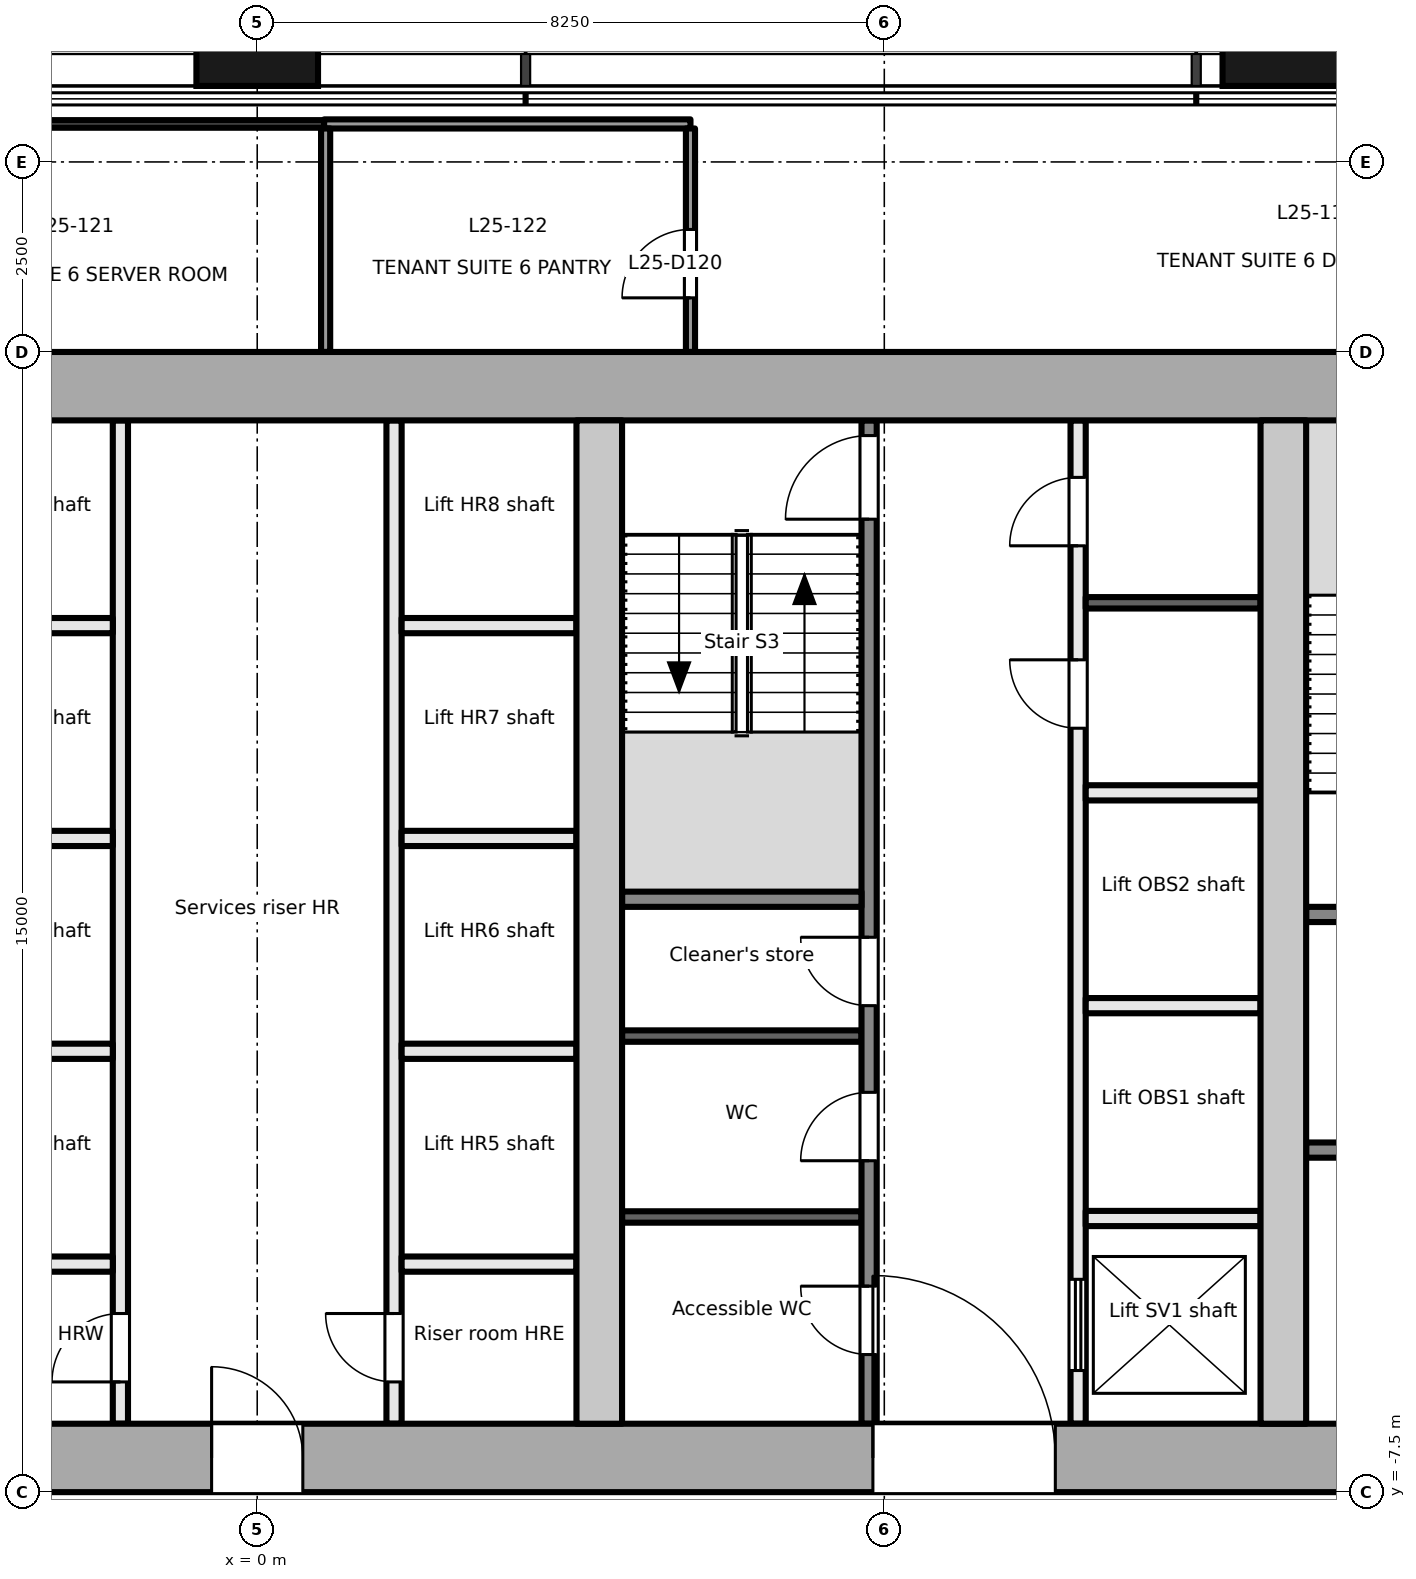
"""IFC4 building model, lengths in metres.
Left out: names, types, materials, properties, quantities, classifications, styles, units other than length and angle.
Written with IfcOpenShell. Run it as: python <this file> out.ifc"""

import sys

from ifc_helpers import new_model, si_unit, direction, frame, frame_2d, origin, origin_2d, place, context, subcontext, project, spatial, rectangle, extrude, element, fill, save


model = new_model("IFC4")
c1 = context("Model", 3, precision=1e-05, world=origin(), true_north=direction((0.0, 1.0)))
c2 = subcontext(c1, "Body", "Model", "MODEL_VIEW")
j1 = project(units=[si_unit("LENGTHUNIT", "METRE"), si_unit("PLANEANGLEUNIT", "RADIAN")], contexts=[c1])
p1 = place(None, origin())
s1 = spatial("IfcSite", under=j1, at=p1, CompositionType="ELEMENT")
p2 = place(p1, origin())
s2 = spatial("IfcBuilding", under=s1, at=p2, CompositionType="ELEMENT")
p3 = place(p2, frame((0.0, 0.0, 111.7)))
s3 = spatial("IfcBuildingStorey", under=s2, at=p3, CompositionType="ELEMENT", Elevation=111.7)
for number, where, z_axis, x_axis in (
    (1, (0.0, 11.9, -0.2), (0.0, 0.0, 1.0), (1.0, 0.0, 0.0)),
    (2, (13.5, 11.9, -0.2), (0.0, 0.0, 1.0), (1.0, 0.0, 0.0)),
):
    element("IfcColumn", number, at=place(p3, frame(where, z_axis=z_axis, x_axis=x_axis)), inside=s3, PredefinedType="COLUMN", context=c2, shape_type="SweptSolid", body=[
        extrude(rectangle(XDim=1.6, YDim=1.8, at=origin_2d()), origin(), (0.0, 0.0, 1.0), 4.0),
    ])
p4 = place(p3, frame((-18.0, -7.05, -0.2), z_axis=(0.0, 0.0, 1.0), x_axis=(1.0, 0.0, 0.0)))
e3 = element("IfcWall", 3, at=p4, inside=s3, PredefinedType="SHEAR", context=c2, shape_type="SweptSolid", body=[
    extrude(rectangle(XDim=36.0, YDim=0.9, at=frame_2d((18.0, 0.0))), origin(), (0.0, 0.0, 1.0), 4.0),
])
p5 = place(p4, frame((7.8, 0.0, 0.2)))
e4 = element("IfcOpeningElement", 4, at=p5, cuts=e3, PredefinedType="OPENING", context=c2, shape_type="SweptSolid", body=[
    extrude(rectangle(XDim=2.4, YDim=2.1, at=frame_2d((1.2, 1.05))), frame((0.0, 0.46, 0.0), z_axis=(0.0, -1.0, 0.0), x_axis=(1.0, 0.0, 0.0)), (0.0, 0.0, 1.0), 0.921),
])
p6 = place(p4, frame((17.4, 0.0, 0.2)))
e5 = element("IfcOpeningElement", 5, at=p6, cuts=e3, PredefinedType="OPENING", context=c2, shape_type="SweptSolid", body=[
    extrude(rectangle(XDim=1.2, YDim=2.1, at=frame_2d((0.6, 1.05))), frame((0.0, 0.46, 0.0), z_axis=(0.0, -1.0, 0.0), x_axis=(1.0, 0.0, 0.0)), (0.0, 0.0, 1.0), 0.921),
])
p7 = place(p4, frame((26.1, 0.0, 0.2)))
e6 = element("IfcOpeningElement", 6, at=p7, cuts=e3, PredefinedType="OPENING", context=c2, shape_type="SweptSolid", body=[
    extrude(rectangle(XDim=2.4, YDim=2.1, at=frame_2d((1.2, 1.05))), frame((0.0, 0.46, 0.0), z_axis=(0.0, -1.0, 0.0), x_axis=(1.0, 0.0, 0.0)), (0.0, 0.0, 1.0), 0.921),
])
p8 = place(p3, frame((-18.0, 7.05, -0.2), z_axis=(0.0, 0.0, 1.0), x_axis=(1.0, 0.0, 0.0)))
e7 = element("IfcWall", 7, at=p8, inside=s3, PredefinedType="SHEAR", context=c2, shape_type="SweptSolid", body=[
    extrude(rectangle(XDim=36.0, YDim=0.9, at=frame_2d((18.0, 0.0))), origin(), (0.0, 0.0, 1.0), 4.0),
])
for number, where, z_axis, x_axis in (
    (8, (4.5, -6.6, -0.2), (0.0, 0.0, 1.0), (0.0, 1.0, 0.0)),
    (9, (13.5, -6.6, -0.2), (0.0, 0.0, 1.0), (0.0, 1.0, 0.0)),
):
    element("IfcWall", number, at=place(p3, frame(where, z_axis=z_axis, x_axis=x_axis)), inside=s3, PredefinedType="SHEAR", context=c2, shape_type="SweptSolid", body=[
        extrude(rectangle(XDim=13.2, YDim=0.6, at=frame_2d((6.6, 0.0))), origin(), (0.0, 0.0, 1.0), 4.0),
    ])
p9 = place(p3, frame((13.8, -3.0, 0.0), z_axis=(0.0, 0.0, 1.0), x_axis=(1.0, 0.0, 0.0)))
e10 = element("IfcWall", 10, at=p9, inside=s3, PredefinedType="PARTITIONING", context=c2, shape_type="SweptSolid", body=[
    extrude(rectangle(XDim=3.3, YDim=0.2, at=frame_2d((1.65, 0.0))), origin(), (0.0, 0.0, 1.0), 3.8),
])
p10 = place(p9, frame((1.1, 0.0, 0.0)))
e11 = element("IfcOpeningElement", 11, at=p10, cuts=e10, PredefinedType="OPENING", context=c2, shape_type="SweptSolid", body=[
    extrude(rectangle(XDim=1.1, YDim=2.1, at=frame_2d((0.55, 1.05))), frame((0.0, 0.111, 0.0), z_axis=(0.0, -1.0, 0.0), x_axis=(1.0, 0.0, 0.0)), (0.0, 0.0, 1.0), 0.221),
])
p11 = place(p3, frame((13.8, 0.1, 0.0), z_axis=(0.0, 0.0, 1.0), x_axis=(1.0, 0.0, 0.0)))
e12 = element("IfcWall", 12, at=p11, inside=s3, PredefinedType="PARTITIONING", context=c2, shape_type="SweptSolid", body=[
    extrude(rectangle(XDim=3.3, YDim=0.2, at=frame_2d((1.65, 0.0))), origin(), (0.0, 0.0, 1.0), 3.8),
])
p12 = place(p11, frame((1.1, 0.0, 0.0)))
e13 = element("IfcOpeningElement", 13, at=p12, cuts=e12, PredefinedType="OPENING", context=c2, shape_type="SweptSolid", body=[
    extrude(rectangle(XDim=1.1, YDim=2.1, at=frame_2d((0.55, 1.05))), frame((0.0, 0.111, 0.0), z_axis=(0.0, -1.0, 0.0), x_axis=(1.0, 0.0, 0.0)), (0.0, 0.0, 1.0), 0.221),
])
p13 = place(p3, frame((-1.8, -6.6, 0.0), z_axis=(0.0, 0.0, 1.0), x_axis=(0.0, 1.0, 0.0)))
e14 = element("IfcWall", 14, at=p13, inside=s3, PredefinedType="PARTITIONING", context=c2, shape_type="SweptSolid", body=[
    extrude(rectangle(XDim=13.2, YDim=0.2, at=frame_2d((6.6, 0.0))), origin(), (0.0, 0.0, 1.0), 3.8),
])
p14 = place(p13, frame((0.55, 0.0, 0.0)))
e15 = element("IfcOpeningElement", 15, at=p14, cuts=e14, PredefinedType="OPENING", context=c2, shape_type="SweptSolid", body=[
    extrude(rectangle(XDim=0.9, YDim=2.1, at=frame_2d((0.45, 1.05))), frame((0.0, 0.111, 0.0), z_axis=(0.0, -1.0, 0.0), x_axis=(1.0, 0.0, 0.0)), (0.0, 0.0, 1.0), 0.221),
])
p15 = place(p3, frame((1.8, -6.6, 0.0), z_axis=(0.0, 0.0, 1.0), x_axis=(0.0, 1.0, 0.0)))
e16 = element("IfcWall", 16, at=p15, inside=s3, PredefinedType="PARTITIONING", context=c2, shape_type="SweptSolid", body=[
    extrude(rectangle(XDim=13.2, YDim=0.2, at=frame_2d((6.6, 0.0))), origin(), (0.0, 0.0, 1.0), 3.8),
])
p16 = place(p15, frame((0.55, 0.0, 0.0)))
e17 = element("IfcOpeningElement", 17, at=p16, cuts=e16, PredefinedType="OPENING", context=c2, shape_type="SweptSolid", body=[
    extrude(rectangle(XDim=0.9, YDim=2.1, at=frame_2d((0.45, 1.05))), frame((0.0, 0.111, 0.0), z_axis=(0.0, -1.0, 0.0), x_axis=(1.0, 0.0, 0.0)), (0.0, 0.0, 1.0), 0.221),
])
for number, where, z_axis, x_axis in (
    (18, (-4.2, -1.7, 0.0), (0.0, 0.0, 1.0), (1.0, 0.0, 0.0)),
    (19, (-4.2, 1.1, 0.0), (0.0, 0.0, 1.0), (1.0, 0.0, 0.0)),
    (20, (-4.2, 3.9, 0.0), (0.0, 0.0, 1.0), (1.0, 0.0, 0.0)),
    (21, (-4.2, -4.5, 0.0), (0.0, 0.0, 1.0), (1.0, 0.0, 0.0)),
    (22, (1.9, -1.7, 0.0), (0.0, 0.0, 1.0), (1.0, 0.0, 0.0)),
    (23, (1.9, 1.1, 0.0), (0.0, 0.0, 1.0), (1.0, 0.0, 0.0)),
    (24, (1.9, 3.9, 0.0), (0.0, 0.0, 1.0), (1.0, 0.0, 0.0)),
    (25, (1.9, -4.5, 0.0), (0.0, 0.0, 1.0), (1.0, 0.0, 0.0)),
):
    element("IfcWall", number, at=place(p3, frame(where, z_axis=z_axis, x_axis=x_axis)), inside=s3, PredefinedType="PARTITIONING", context=c2, shape_type="SweptSolid", body=[
        extrude(rectangle(XDim=2.3, YDim=0.2, at=frame_2d((1.15, 0.0))), origin(), (0.0, 0.0, 1.0), 3.8),
    ])
p17 = place(p3, frame((8.05, -6.6, 0.0), z_axis=(0.0, 0.0, 1.0), x_axis=(0.0, 1.0, 0.0)))
e26 = element("IfcWall", 26, at=p17, inside=s3, PredefinedType="PARTITIONING", context=c2, shape_type="SweptSolid", body=[
    extrude(rectangle(XDim=13.2, YDim=0.2, at=frame_2d((6.6, 0.0))), origin(), (0.0, 0.0, 1.0), 3.8),
])
p18 = place(p17, frame((0.91, 0.0, 0.0)))
e27 = element("IfcOpeningElement", 27, at=p18, cuts=e26, PredefinedType="OPENING", context=c2, shape_type="SweptSolid", body=[
    extrude(rectangle(XDim=0.9, YDim=2.1, at=frame_2d((0.45, 1.05))), frame((0.0, 0.111, 0.0), z_axis=(0.0, -1.0, 0.0), x_axis=(1.0, 0.0, 0.0)), (0.0, 0.0, 1.0), 0.221),
])
p19 = place(p17, frame((3.46, 0.0, 0.0)))
e28 = element("IfcOpeningElement", 28, at=p19, cuts=e26, PredefinedType="OPENING", context=c2, shape_type="SweptSolid", body=[
    extrude(rectangle(XDim=0.9, YDim=2.1, at=frame_2d((0.45, 1.05))), frame((0.0, 0.111, 0.0), z_axis=(0.0, -1.0, 0.0), x_axis=(1.0, 0.0, 0.0)), (0.0, 0.0, 1.0), 0.221),
])
p20 = place(p17, frame((5.5, 0.0, 0.0)))
e29 = element("IfcOpeningElement", 29, at=p20, cuts=e26, PredefinedType="OPENING", context=c2, shape_type="SweptSolid", body=[
    extrude(rectangle(XDim=0.9, YDim=2.1, at=frame_2d((0.45, 1.05))), frame((0.0, 0.111, 0.0), z_axis=(0.0, -1.0, 0.0), x_axis=(1.0, 0.0, 0.0)), (0.0, 0.0, 1.0), 0.221),
])
p21 = place(p17, frame((11.9, 0.0, 0.0)))
e30 = element("IfcOpeningElement", 30, at=p21, cuts=e26, PredefinedType="OPENING", context=c2, shape_type="SweptSolid", body=[
    extrude(rectangle(XDim=1.1, YDim=2.1, at=frame_2d((0.55, 1.05))), frame((0.0, 0.111, 0.0), z_axis=(0.0, -1.0, 0.0), x_axis=(1.0, 0.0, 0.0)), (0.0, 0.0, 1.0), 0.221),
])
p22 = place(p3, frame((10.8, -6.6, 0.0), z_axis=(0.0, 0.0, 1.0), x_axis=(0.0, 1.0, 0.0)))
e31 = element("IfcWall", 31, at=p22, inside=s3, PredefinedType="PARTITIONING", context=c2, shape_type="SweptSolid", body=[
    extrude(rectangle(XDim=13.2, YDim=0.2, at=frame_2d((6.6, 0.0))), origin(), (0.0, 0.0, 1.0), 3.8),
])
p23 = place(p22, frame((0.7, 0.0, 0.0)))
e32 = element("IfcOpeningElement", 32, at=p23, cuts=e31, PredefinedType="OPENING", context=c2, shape_type="SweptSolid", body=[
    extrude(rectangle(XDim=1.2, YDim=2.1, at=frame_2d((0.6, 1.05))), frame((0.0, 0.111, 0.0), z_axis=(0.0, -1.0, 0.0), x_axis=(1.0, 0.0, 0.0)), (0.0, 0.0, 1.0), 0.221),
])
p24 = place(p22, frame((9.15, 0.0, 0.0)))
e33 = element("IfcOpeningElement", 33, at=p24, cuts=e31, PredefinedType="OPENING", context=c2, shape_type="SweptSolid", body=[
    extrude(rectangle(XDim=0.9, YDim=2.1, at=frame_2d((0.45, 1.05))), frame((0.0, 0.111, 0.0), z_axis=(0.0, -1.0, 0.0), x_axis=(1.0, 0.0, 0.0)), (0.0, 0.0, 1.0), 0.221),
])
p25 = place(p22, frame((11.55, 0.0, 0.0)))
e34 = element("IfcOpeningElement", 34, at=p25, cuts=e31, PredefinedType="OPENING", context=c2, shape_type="SweptSolid", body=[
    extrude(rectangle(XDim=0.9, YDim=2.1, at=frame_2d((0.45, 1.05))), frame((0.0, 0.111, 0.0), z_axis=(0.0, -1.0, 0.0), x_axis=(1.0, 0.0, 0.0)), (0.0, 0.0, 1.0), 0.221),
])
p26 = place(p3, frame((4.8, 0.3, 0.0), z_axis=(0.0, 0.0, 1.0), x_axis=(1.0, 0.0, 0.0)))
e35 = element("IfcWall", 35, at=p26, inside=s3, PredefinedType="PARTITIONING", context=c2, shape_type="SweptSolid", body=[
    extrude(rectangle(XDim=3.15, YDim=0.2, at=frame_2d((1.575, 0.0))), origin(), (0.0, 0.0, 1.0), 3.8),
])
for number, where, z_axis, x_axis in (
    (36, (4.8, -3.88, 0.0), (0.0, 0.0, 1.0), (1.0, 0.0, 0.0)),
    (37, (4.8, -1.5, 0.0), (0.0, 0.0, 1.0), (1.0, 0.0, 0.0)),
):
    element("IfcWall", number, at=place(p3, frame(where, z_axis=z_axis, x_axis=x_axis)), inside=s3, PredefinedType="PARTITIONING", context=c2, shape_type="SweptSolid", body=[
        extrude(rectangle(XDim=3.15, YDim=0.15, at=frame_2d((1.575, 0.0))), origin(), (0.0, 0.0, 1.0), 3.8),
    ])
for number, where, z_axis, x_axis in (
    (38, (10.9, -3.9, 0.0), (0.0, 0.0, 1.0), (1.0, 0.0, 0.0)),
    (39, (10.9, -1.1, 0.0), (0.0, 0.0, 1.0), (1.0, 0.0, 0.0)),
    (40, (10.9, 1.7, 0.0), (0.0, 0.0, 1.0), (1.0, 0.0, 0.0)),
):
    element("IfcWall", number, at=place(p3, frame(where, z_axis=z_axis, x_axis=x_axis)), inside=s3, PredefinedType="PARTITIONING", context=c2, shape_type="SweptSolid", body=[
        extrude(rectangle(XDim=2.3, YDim=0.2, at=frame_2d((1.15, 0.0))), origin(), (0.0, 0.0, 1.0), 3.8),
    ])
p27 = place(p3, frame((10.9, 4.2, 0.0), z_axis=(0.0, 0.0, 1.0), x_axis=(1.0, 0.0, 0.0)))
e41 = element("IfcWall", 41, at=p27, inside=s3, PredefinedType="PARTITIONING", context=c2, shape_type="SweptSolid", body=[
    extrude(rectangle(XDim=2.3, YDim=0.15, at=frame_2d((1.15, 0.0))), origin(), (0.0, 0.0, 1.0), 3.8),
])
p28 = place(p3, frame((0.88, 10.5, 0.0), z_axis=(0.0, 0.0, 1.0), x_axis=(-1.0, 0.0, 0.0)))
e42 = element("IfcWall", 42, at=p28, inside=s3, PredefinedType="PARTITIONING", context=c2, shape_type="SweptSolid", body=[
    extrude(rectangle(XDim=6.6, YDim=0.1, at=frame_2d((3.3, 0.0))), origin(), (0.0, 0.0, 1.0), 3.5),
])
p29 = place(p3, frame((5.7, 10.5, 0.0), z_axis=(0.0, 0.0, 1.0), x_axis=(-1.0, 0.0, 0.0)))
e43 = element("IfcWall", 43, at=p29, inside=s3, PredefinedType="PARTITIONING", context=c2, shape_type="SweptSolid", body=[
    extrude(rectangle(XDim=4.82, YDim=0.12, at=frame_2d((2.41, 0.0))), origin(), (0.0, 0.0, 1.0), 3.5),
])
p30 = place(p3, frame((5.7, 7.5, 0.0), z_axis=(0.0, 0.0, 1.0), x_axis=(0.0, 1.0, 0.0)))
e44 = element("IfcWall", 44, at=p30, inside=s3, PredefinedType="PARTITIONING", context=c2, shape_type="SweptSolid", body=[
    extrude(rectangle(XDim=2.94, YDim=0.12, at=frame_2d((1.47, 0.0))), origin(), (0.0, 0.0, 1.0), 3.8),
])
p31 = place(p30, frame((0.712, 0.0, 0.0)))
e45 = element("IfcOpeningElement", 45, at=p31, cuts=e44, PredefinedType="OPENING", context=c2, shape_type="SweptSolid", body=[
    extrude(rectangle(XDim=0.9, YDim=2.1, at=frame_2d((0.45, 1.05))), frame((0.0, 0.071, 0.0), z_axis=(0.0, -1.0, 0.0), x_axis=(1.0, 0.0, 0.0)), (0.0, 0.0, 1.0), 0.141),
])
p32 = place(p3, frame((0.9, 10.44, 0.0), z_axis=(0.0, 0.0, 1.0), x_axis=(0.0, -1.0, 0.0)))
e46 = element("IfcWall", 46, at=p32, inside=s3, PredefinedType="PARTITIONING", context=c2, shape_type="SweptSolid", body=[
    extrude(rectangle(XDim=2.94, YDim=0.12, at=frame_2d((1.47, 0.0))), origin(), (0.0, 0.0, 1.0), 3.8),
])
p33 = place(p14, origin())
e47 = element("IfcDoor", 47, at=p33, inside=s3, OperationType="SINGLE_SWING_LEFT", PredefinedType="DOOR", context=c2, shape_type="SweptSolid", body=[
    extrude(rectangle(XDim=0.9, YDim=2.1, at=frame_2d((0.45, 1.05))), frame((0.0, 0.025, 0.0), z_axis=(0.0, -1.0, 0.0), x_axis=(1.0, 0.0, 0.0)), (0.0, 0.0, 1.0), 0.05),
])
fill(e15, e47)
p34 = place(p16, origin())
e48 = element("IfcDoor", 48, at=p34, inside=s3, OperationType="SINGLE_SWING_RIGHT", PredefinedType="DOOR", context=c2, shape_type="SweptSolid", body=[
    extrude(rectangle(XDim=0.9, YDim=2.1, at=frame_2d((0.45, 1.05))), frame((0.0, 0.025, 0.0), z_axis=(0.0, -1.0, 0.0), x_axis=(1.0, 0.0, 0.0)), (0.0, 0.0, 1.0), 0.05),
])
fill(e17, e48)
p35 = place(p6, origin())
e49 = element("IfcDoor", 49, at=p35, inside=s3, OperationType="SINGLE_SWING_LEFT", PredefinedType="DOOR", context=c2, shape_type="SweptSolid", body=[
    extrude(rectangle(XDim=1.2, YDim=2.1, at=frame_2d((0.6, 1.05))), frame((0.0, 0.025, 0.0), z_axis=(0.0, -1.0, 0.0), x_axis=(1.0, 0.0, 0.0)), (0.0, 0.0, 1.0), 0.05),
])
fill(e5, e49)
p36 = place(p18, origin())
e50 = element("IfcDoor", 50, at=p36, inside=s3, OperationType="SINGLE_SWING_RIGHT", PredefinedType="DOOR", context=c2, shape_type="SweptSolid", body=[
    extrude(rectangle(XDim=0.9, YDim=2.1, at=frame_2d((0.45, 1.05))), frame((0.0, 0.025, 0.0), z_axis=(0.0, -1.0, 0.0), x_axis=(1.0, 0.0, 0.0)), (0.0, 0.0, 1.0), 0.05),
])
fill(e27, e50)
p37 = place(p19, origin())
e51 = element("IfcDoor", 51, at=p37, inside=s3, OperationType="SINGLE_SWING_LEFT", PredefinedType="DOOR", context=c2, shape_type="SweptSolid", body=[
    extrude(rectangle(XDim=0.9, YDim=2.1, at=frame_2d((0.45, 1.05))), frame((0.0, 0.025, 0.0), z_axis=(0.0, -1.0, 0.0), x_axis=(1.0, 0.0, 0.0)), (0.0, 0.0, 1.0), 0.05),
])
fill(e28, e51)
p38 = place(p20, origin())
e52 = element("IfcDoor", 52, at=p38, inside=s3, OperationType="SINGLE_SWING_RIGHT", PredefinedType="DOOR", context=c2, shape_type="SweptSolid", body=[
    extrude(rectangle(XDim=0.9, YDim=2.1, at=frame_2d((0.45, 1.05))), frame((0.0, 0.025, 0.0), z_axis=(0.0, -1.0, 0.0), x_axis=(1.0, 0.0, 0.0)), (0.0, 0.0, 1.0), 0.05),
])
fill(e29, e52)
p39 = place(p21, origin())
e53 = element("IfcDoor", 53, at=p39, inside=s3, OperationType="SINGLE_SWING_LEFT", PredefinedType="DOOR", context=c2, shape_type="SweptSolid", body=[
    extrude(rectangle(XDim=1.1, YDim=2.1, at=frame_2d((0.55, 1.05))), frame((0.0, 0.025, 0.0), z_axis=(0.0, -1.0, 0.0), x_axis=(1.0, 0.0, 0.0)), (0.0, 0.0, 1.0), 0.05),
])
fill(e30, e53)
p40 = place(p7, origin())
e54 = element("IfcDoor", 54, at=p40, inside=s3, OperationType="DOUBLE_DOOR_DOUBLE_SWING", PredefinedType="DOOR", context=c2, shape_type="SweptSolid", body=[
    extrude(rectangle(XDim=2.4, YDim=2.1, at=frame_2d((1.2, 1.05))), frame((0.0, 0.025, 0.0), z_axis=(0.0, -1.0, 0.0), x_axis=(1.0, 0.0, 0.0)), (0.0, 0.0, 1.0), 0.05),
])
fill(e6, e54)
p41 = place(p23, origin())
e55 = element("IfcDoor", 55, at=p41, inside=s3, OperationType="DOUBLE_DOOR_SLIDING", PredefinedType="DOOR", context=c2, shape_type="SweptSolid", body=[
    extrude(rectangle(XDim=1.2, YDim=2.1, at=frame_2d((0.6, 1.05))), frame((0.0, 0.025, 0.0), z_axis=(0.0, -1.0, 0.0), x_axis=(1.0, 0.0, 0.0)), (0.0, 0.0, 1.0), 0.05),
])
fill(e32, e55)
p42 = place(p24, origin())
e56 = element("IfcDoor", 56, at=p42, inside=s3, OperationType="SINGLE_SWING_RIGHT", PredefinedType="DOOR", context=c2, shape_type="SweptSolid", body=[
    extrude(rectangle(XDim=0.9, YDim=2.1, at=frame_2d((0.45, 1.05))), frame((0.0, 0.025, 0.0), z_axis=(0.0, -1.0, 0.0), x_axis=(1.0, 0.0, 0.0)), (0.0, 0.0, 1.0), 0.05),
])
fill(e33, e56)
p43 = place(p25, origin())
e57 = element("IfcDoor", 57, at=p43, inside=s3, OperationType="SINGLE_SWING_LEFT", PredefinedType="DOOR", context=c2, shape_type="SweptSolid", body=[
    extrude(rectangle(XDim=0.9, YDim=2.1, at=frame_2d((0.45, 1.05))), frame((0.0, 0.025, 0.0), z_axis=(0.0, -1.0, 0.0), x_axis=(1.0, 0.0, 0.0)), (0.0, 0.0, 1.0), 0.05),
])
fill(e34, e57)
p44 = place(p31, origin())
e58 = element("IfcDoor", 58, at=p44, inside=s3, OperationType="SINGLE_SWING_LEFT", PredefinedType="DOOR", context=c2, shape_type="SweptSolid", body=[
    extrude(rectangle(XDim=0.9, YDim=2.1, at=frame_2d((0.45, 1.05))), frame((0.0, 0.025, 0.0), z_axis=(0.0, -1.0, 0.0), x_axis=(1.0, 0.0, 0.0)), (0.0, 0.0, 1.0), 0.05),
])
fill(e45, e58)
save(model, sys.argv[1])
